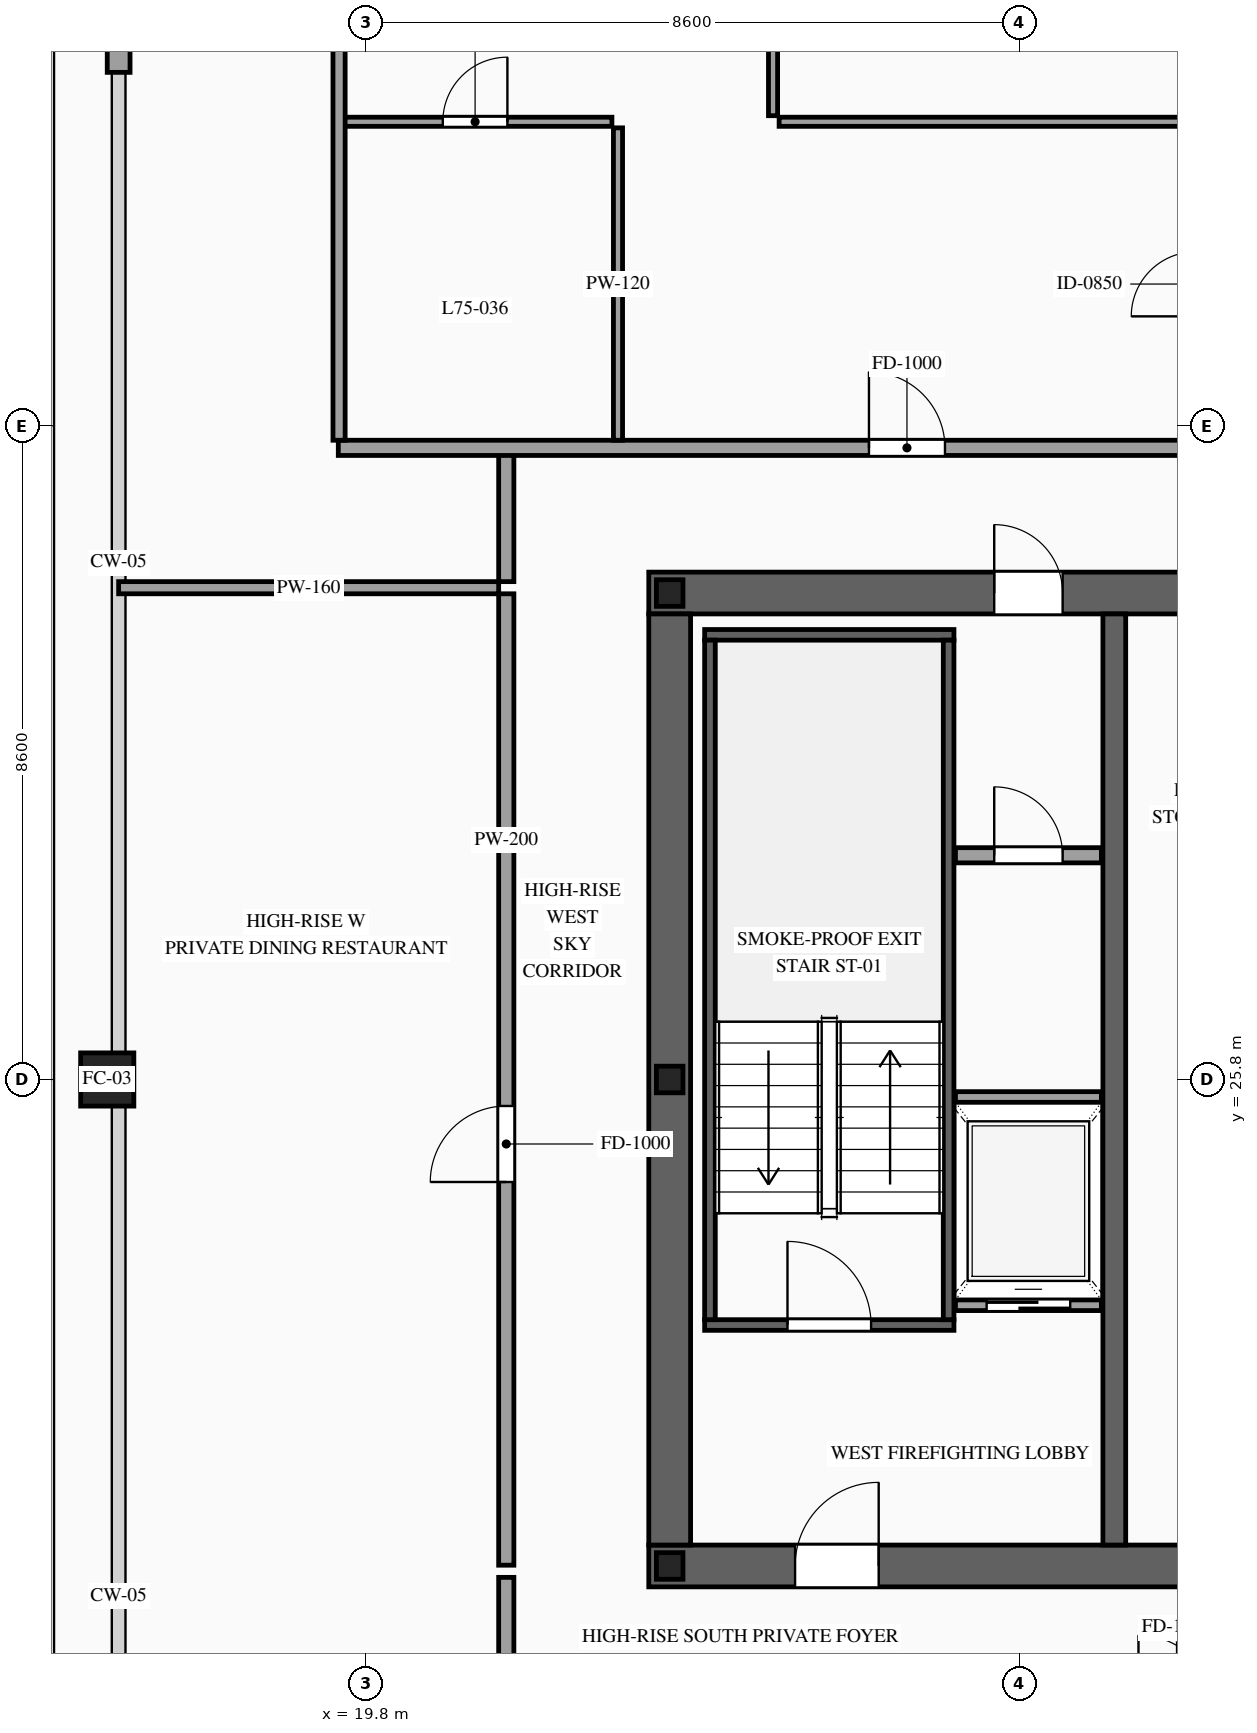
"""IFC4 building model, lengths in metres.
Left out: names, types, materials, properties, quantities, classifications, styles, units other than length and angle.
Written with IfcOpenShell. Run it as: python <this file> out.ifc"""

import sys

from ifc_helpers import new_model, si_unit, direction, frame, frame_2d, origin, origin_2d, place, context, subcontext, project, spatial, rectangle, hollow_rectangle, i_section, extrude, source, transform, mapped, element, fill, save


model = new_model("IFC4")
c1 = context("Model", 3, precision=1e-05, world=origin(), true_north=direction((0.0, 1.0)))
c2 = subcontext(c1, "Body", "Model", "MODEL_VIEW")
j1 = project(units=[si_unit("LENGTHUNIT", "METRE"), si_unit("PLANEANGLEUNIT", "RADIAN")], contexts=[c1])
p1 = place(None, origin())
s1 = spatial("IfcSite", under=j1, at=p1, CompositionType="ELEMENT")
p2 = place(p1, origin())
s2 = spatial("IfcBuilding", under=s1, at=p2, CompositionType="ELEMENT")
p3 = place(p2, frame((0.0, 0.0, 282.1)))
s3 = spatial("IfcBuildingStorey", under=s2, at=p3, CompositionType="ELEMENT", Elevation=282.1)
p4 = place(p3, frame((23.525, 19.4, 0.0), z_axis=(0.0, 0.0, 1.0), x_axis=(1.0, 0.0, 0.0)))
e1 = element("IfcWall", 1, at=p4, inside=s3, PredefinedType="SHEAR", context=c2, shape_type="SweptSolid", body=[
    extrude(rectangle(XDim=26.95, YDim=0.55, at=frame_2d((13.475, 0.0))), origin(), (0.0, 0.0, 1.0), 3.5),
])
p5 = place(p4, frame((1.925, 0.0, 0.0)))
e2 = element("IfcOpeningElement", 2, at=p5, cuts=e1, PredefinedType="OPENING", context=c2, shape_type="SweptSolid", body=[
    extrude(rectangle(XDim=1.1, YDim=2.2, at=frame_2d((0.55, 1.1))), frame((0.0, 0.29, 0.0), z_axis=(0.0, -1.0, 0.0), x_axis=(1.0, 0.0, 0.0)), (0.0, 0.0, 1.0), 0.58),
])
p6 = place(p4, frame((9.825, 0.0, 0.0)))
e3 = element("IfcOpeningElement", 3, at=p6, cuts=e1, PredefinedType="OPENING", context=c2, shape_type="SweptSolid", body=[
    extrude(rectangle(XDim=1.1, YDim=2.2, at=frame_2d((0.55, 1.1))), frame((0.0, 0.29, 0.0), z_axis=(0.0, -1.0, 0.0), x_axis=(1.0, 0.0, 0.0)), (0.0, 0.0, 1.0), 0.58),
])
p7 = place(p4, frame((23.025, 0.0, 0.0)))
e4 = element("IfcOpeningElement", 4, at=p7, cuts=e1, PredefinedType="OPENING", context=c2, shape_type="SweptSolid", body=[
    extrude(rectangle(XDim=1.1, YDim=2.2, at=frame_2d((0.55, 1.1))), frame((0.0, 0.29, 0.0), z_axis=(0.0, -1.0, 0.0), x_axis=(1.0, 0.0, 0.0)), (0.0, 0.0, 1.0), 0.58),
])
p8 = place(p4, frame((19.645, 0.0, 0.0)))
e5 = element("IfcOpeningElement", 5, at=p8, cuts=e1, PredefinedType="OPENING", context=c2, shape_type="SweptSolid", body=[
    extrude(rectangle(XDim=0.9, YDim=2.15, at=frame_2d((0.45, 1.075))), frame((0.0, 0.29, 0.0), z_axis=(0.0, -1.0, 0.0), x_axis=(1.0, 0.0, 0.0)), (0.0, 0.0, 1.0), 0.58),
])
p9 = place(p4, frame((18.205, 0.0, 0.0)))
e6 = element("IfcOpeningElement", 6, at=p9, cuts=e1, PredefinedType="OPENING", context=c2, shape_type="SweptSolid", body=[
    extrude(rectangle(XDim=0.9, YDim=2.15, at=frame_2d((0.45, 1.075))), frame((0.0, 0.29, 0.0), z_axis=(0.0, -1.0, 0.0), x_axis=(1.0, 0.0, 0.0)), (0.0, 0.0, 1.0), 0.58),
])
p10 = place(p3, frame((23.525, 32.2, 0.0), z_axis=(0.0, 0.0, 1.0), x_axis=(1.0, 0.0, 0.0)))
e7 = element("IfcWall", 7, at=p10, inside=s3, PredefinedType="SHEAR", context=c2, shape_type="SweptSolid", body=[
    extrude(rectangle(XDim=26.95, YDim=0.55, at=frame_2d((13.475, 0.0))), origin(), (0.0, 0.0, 1.0), 3.5),
])
p11 = place(p10, frame((4.545, 0.0, 0.0)))
e8 = element("IfcOpeningElement", 8, at=p11, cuts=e7, PredefinedType="OPENING", context=c2, shape_type="SweptSolid", body=[
    extrude(rectangle(XDim=0.9, YDim=2.15, at=frame_2d((0.45, 1.075))), frame((0.0, 0.29, 0.0), z_axis=(0.0, -1.0, 0.0), x_axis=(1.0, 0.0, 0.0)), (0.0, 0.0, 1.0), 0.58),
])
p12 = place(p10, frame((9.825, 0.0, 0.0)))
e9 = element("IfcOpeningElement", 9, at=p12, cuts=e7, PredefinedType="OPENING", context=c2, shape_type="SweptSolid", body=[
    extrude(rectangle(XDim=1.1, YDim=2.2, at=frame_2d((0.55, 1.1))), frame((0.0, 0.29, 0.0), z_axis=(0.0, -1.0, 0.0), x_axis=(1.0, 0.0, 0.0)), (0.0, 0.0, 1.0), 0.58),
])
p13 = place(p10, frame((15.675, 0.0, 0.0)))
e10 = element("IfcOpeningElement", 10, at=p13, cuts=e7, PredefinedType="OPENING", context=c2, shape_type="SweptSolid", body=[
    extrude(rectangle(XDim=1.1, YDim=2.2, at=frame_2d((0.55, 1.1))), frame((0.0, 0.29, 0.0), z_axis=(0.0, -1.0, 0.0), x_axis=(1.0, 0.0, 0.0)), (0.0, 0.0, 1.0), 0.58),
])
p14 = place(p10, frame((18.775, 0.0, 0.0)))
e11 = element("IfcOpeningElement", 11, at=p14, cuts=e7, PredefinedType="OPENING", context=c2, shape_type="SweptSolid", body=[
    extrude(rectangle(XDim=1.1, YDim=2.2, at=frame_2d((0.55, 1.1))), frame((0.0, 0.29, 0.0), z_axis=(0.0, -1.0, 0.0), x_axis=(1.0, 0.0, 0.0)), (0.0, 0.0, 1.0), 0.58),
])
m1 = source(origin(), c2, "Body", "SweptSolid", [
    extrude(rectangle(XDim=12.25, YDim=0.55, at=frame_2d((6.125, 0.0))), origin(), (0.0, 0.0, 1.0), 3.5),
])
p15 = place(p3, frame((23.8, 19.675, 0.0), z_axis=(0.0, 0.0, 1.0), x_axis=(0.0, 1.0, 0.0)))
e12 = element("IfcWall", 12, at=p15, inside=s3, PredefinedType="SHEAR", context=c2, shape_type="MappedRepresentation", body=[
    mapped(m1, transform((0.0, 0.0, 0.0), scale=1.0)),
])
m2 = source(origin(), c2, "Body", "SweptSolid", [
    extrude(rectangle(XDim=12.25, YDim=0.3, at=frame_2d((6.125, 0.0))), origin(), (0.0, 0.0, 1.0), 3.5),
])
p16 = place(p3, frame((29.65, 19.675, 0.0), z_axis=(0.0, 0.0, 1.0), x_axis=(0.0, 1.0, 0.0)))
e13 = element("IfcWall", 13, at=p16, inside=s3, PredefinedType="SOLIDWALL", context=c2, shape_type="MappedRepresentation", body=[
    mapped(m2, transform((0.0, 0.0, 0.0), scale=1.0)),
])
m3 = source(origin(), c2, "Body", "SweptSolid", [
    extrude(i_section(OverallWidth=0.35, OverallDepth=0.35, WebThickness=0.012, FlangeThickness=0.019, at=origin_2d()), origin(), (0.0, 0.0, 1.0), 3.5),
])
for number, where, z_axis, x_axis in (
    (14, (23.8, 19.4, 0.0), (0.0, 0.0, 1.0), (1.0, 0.0, 0.0)),
    (15, (23.8, 25.8, 0.0), (0.0, 0.0, 1.0), (1.0, 0.0, 0.0)),
    (16, (23.8, 32.2, 0.0), (0.0, 0.0, 1.0), (1.0, 0.0, 0.0)),
):
    element("IfcColumn", number, at=place(p3, frame(where, z_axis=z_axis, x_axis=x_axis)), inside=s3, PredefinedType="COLUMN", context=c2, shape_type="MappedRepresentation", body=[
        mapped(m3, transform((0.0, 0.0, 0.0), scale=1.0)),
    ])
m4 = source(origin(), c2, "Body", "SweptSolid", [
    extrude(hollow_rectangle(XDim=0.7, YDim=0.7, WallThickness=0.032, at=origin_2d()), origin(), (0.0, 0.0, 1.0), 3.28),
])
p17 = place(p3, frame((16.4, 25.8, 0.0), z_axis=(0.0, 0.0, 1.0), x_axis=(1.0, 0.0, 0.0)))
e17 = element("IfcColumn", 17, at=p17, inside=s3, PredefinedType="COLUMN", context=c2, shape_type="MappedRepresentation", body=[
    mapped(m4, transform((0.0, 0.0, 0.0), scale=1.0)),
])
m5 = source(origin(), c2, "Body", "SweptSolid", [
    extrude(rectangle(XDim=3.15, YDim=0.3, at=frame_2d((1.575, 0.0))), origin(), (0.0, 0.0, 1.0), 2.835),
])
p18 = place(p3, frame((16.55, 39.05, 0.0), z_axis=(0.0, 0.0, 1.0), x_axis=(0.0, 1.0, 0.0)))
e18 = element("IfcWall", 18, at=p18, inside=s3, PredefinedType="SOLIDWALL", context=c2, shape_type="MappedRepresentation", body=[
    mapped(m5, transform((0.0, 0.0, 0.0), scale=1.0)),
])
p19 = place(p3, frame((27.56, 22.83, 0.0), z_axis=(0.0, 0.0, 1.0), x_axis=(1.0, 0.0, 0.0)))
e19 = element("IfcWall", 19, at=p19, inside=s3, PredefinedType="SOLIDWALL", context=c2, shape_type="SweptSolid", body=[
    extrude(rectangle(XDim=1.92, YDim=0.14, at=frame_2d((0.96, 0.0))), origin(), (0.0, 0.0, 1.0), 3.28),
])
p20 = place(p19, frame((0.41, 0.0, 0.0)))
e20 = element("IfcOpeningElement", 20, at=p20, cuts=e19, PredefinedType="OPENING", context=c2, shape_type="SweptSolid", body=[
    extrude(rectangle(XDim=1.1, YDim=2.2, at=frame_2d((0.55, 1.1))), frame((0.0, 0.085, 0.0), z_axis=(0.0, -1.0, 0.0), x_axis=(1.0, 0.0, 0.0)), (0.0, 0.0, 1.0), 0.17),
])
m6 = source(origin(), c2, "Body", "SweptSolid", [
    extrude(rectangle(XDim=1.92, YDim=0.14, at=frame_2d((0.96, 0.0))), origin(), (0.0, 0.0, 1.0), 3.28),
])
p21 = place(p3, frame((27.56, 25.57, 0.0), z_axis=(0.0, 0.0, 1.0), x_axis=(1.0, 0.0, 0.0)))
e21 = element("IfcWall", 21, at=p21, inside=s3, PredefinedType="SOLIDWALL", context=c2, shape_type="MappedRepresentation", body=[
    mapped(m6, transform((0.0, 0.0, 0.0), scale=1.0)),
])
p22 = place(p3, frame((24.26, 22.57, 0.0), z_axis=(0.0, 0.0, 1.0), x_axis=(1.0, 0.0, 0.0)))
e22 = element("IfcWall", 22, at=p22, inside=s3, PredefinedType="SOLIDWALL", context=c2, shape_type="SweptSolid", body=[
    extrude(rectangle(XDim=3.28, YDim=0.14, at=frame_2d((1.64, 0.0))), origin(), (0.0, 0.0, 1.0), 3.28),
])
p23 = place(p22, frame((1.09, 0.0, 0.0)))
e23 = element("IfcOpeningElement", 23, at=p23, cuts=e22, PredefinedType="OPENING", context=c2, shape_type="SweptSolid", body=[
    extrude(rectangle(XDim=1.1, YDim=2.2, at=frame_2d((0.55, 1.1))), frame((0.0, 0.085, 0.0), z_axis=(0.0, -1.0, 0.0), x_axis=(1.0, 0.0, 0.0)), (0.0, 0.0, 1.0), 0.17),
])
m7 = source(origin(), c2, "Body", "SweptSolid", [
    extrude(rectangle(XDim=3.28, YDim=0.14, at=frame_2d((1.64, 0.0))), origin(), (0.0, 0.0, 1.0), 3.28),
])
p24 = place(p3, frame((24.26, 31.65, 0.0), z_axis=(0.0, 0.0, 1.0), x_axis=(1.0, 0.0, 0.0)))
e24 = element("IfcWall", 24, at=p24, inside=s3, PredefinedType="SOLIDWALL", context=c2, shape_type="MappedRepresentation", body=[
    mapped(m7, transform((0.0, 0.0, 0.0), scale=1.0)),
])
m8 = source(origin(), c2, "Body", "SweptSolid", [
    extrude(rectangle(XDim=8.94, YDim=0.14, at=frame_2d((4.47, 0.0))), origin(), (0.0, 0.0, 1.0), 3.28),
])
for number, where, z_axis, x_axis in (
    (25, (24.33, 22.64, 0.0), (0.0, 0.0, 1.0), (0.0, 1.0, 0.0)),
    (26, (27.47, 22.64, 0.0), (0.0, 0.0, 1.0), (0.0, 1.0, 0.0)),
):
    element("IfcWall", number, at=place(p3, frame(where, z_axis=z_axis, x_axis=x_axis)), inside=s3, PredefinedType="SOLIDWALL", context=c2, shape_type="MappedRepresentation", body=[
        mapped(m8, transform((0.0, 0.0, 0.0), scale=1.0)),
    ])
p25 = place(p3, frame((27.56, 28.75, 0.0), z_axis=(0.0, 0.0, 1.0), x_axis=(1.0, 0.0, 0.0)))
e27 = element("IfcWall", 27, at=p25, inside=s3, PredefinedType="PARTITIONING", context=c2, shape_type="SweptSolid", body=[
    extrude(rectangle(XDim=1.92, YDim=0.2, at=frame_2d((0.96, 0.0))), origin(), (0.0, 0.0, 1.0), 3.28),
])
p26 = place(p25, frame((0.51, 0.0, 0.0)))
e28 = element("IfcOpeningElement", 28, at=p26, cuts=e27, PredefinedType="OPENING", context=c2, shape_type="SweptSolid", body=[
    extrude(rectangle(XDim=0.9, YDim=2.15, at=frame_2d((0.45, 1.075))), frame((0.0, 0.115, 0.0), z_axis=(0.0, -1.0, 0.0), x_axis=(1.0, 0.0, 0.0)), (0.0, 0.0, 1.0), 0.23),
])
m9 = source(origin(), c2, "Body", "SweptSolid", [
    extrude(rectangle(XDim=1.7, YDim=0.2, at=frame_2d((0.85, 0.0))), origin(), (0.0, 0.0, 1.0), 3.28),
])
for number, where, z_axis, x_axis in (
    (29, (21.65, 32.35, 0.0), (0.0, 0.0, 1.0), (0.0, 1.0, 0.0)),
    (30, (21.65, 17.55, 0.0), (0.0, 0.0, 1.0), (0.0, 1.0, 0.0)),
):
    element("IfcWall", number, at=place(p3, frame(where, z_axis=z_axis, x_axis=x_axis)), inside=s3, PredefinedType="PARTITIONING", context=c2, shape_type="MappedRepresentation", body=[
        mapped(m9, transform((0.0, 0.0, 0.0), scale=1.0)),
    ])
p27 = place(p3, frame((19.44, 34.11, 0.0), z_axis=(0.0, 0.0, 1.0), x_axis=(1.0, 0.0, 0.0)))
e31 = element("IfcWall", 31, at=p27, inside=s3, PredefinedType="PARTITIONING", context=c2, shape_type="SweptSolid", body=[
    extrude(rectangle(XDim=16.075, YDim=0.2, at=frame_2d((8.038, 0.0))), origin(), (0.0, 0.0, 1.0), 3.28),
])
p28 = place(p27, frame((6.982, 0.0, 0.0)))
e32 = element("IfcOpeningElement", 32, at=p28, cuts=e31, PredefinedType="OPENING", context=c2, shape_type="SweptSolid", body=[
    extrude(rectangle(XDim=1.0, YDim=2.2, at=frame_2d((0.5, 1.1))), frame((0.0, 0.115, 0.0), z_axis=(0.0, -1.0, 0.0), x_axis=(1.0, 0.0, 0.0)), (0.0, 0.0, 1.0), 0.23),
])
p29 = place(p3, frame((19.44, 38.4, 0.0), z_axis=(0.0, 0.0, 1.0), x_axis=(1.0, 0.0, 0.0)))
e33 = element("IfcWall", 33, at=p29, inside=s3, PredefinedType="PARTITIONING", context=c2, shape_type="SweptSolid", body=[
    extrude(rectangle(XDim=3.6, YDim=0.12, at=frame_2d((1.8, 0.0))), origin(), (0.0, 0.0, 1.0), 3.28),
])
p30 = place(p29, frame((1.375, 0.0, 0.0)))
e34 = element("IfcOpeningElement", 34, at=p30, cuts=e33, PredefinedType="OPENING", context=c2, shape_type="SweptSolid", body=[
    extrude(rectangle(XDim=0.85, YDim=2.1, at=frame_2d((0.425, 1.05))), frame((0.0, 0.075, 0.0), z_axis=(0.0, -1.0, 0.0), x_axis=(1.0, 0.0, 0.0)), (0.0, 0.0, 1.0), 0.15),
])
m10 = source(origin(), c2, "Body", "SweptSolid", [
    extrude(rectangle(XDim=4.11, YDim=0.12, at=frame_2d((2.055, 0.0))), origin(), (0.0, 0.0, 1.0), 1.675),
])
p31 = place(p3, frame((23.12, 34.21, 0.0), z_axis=(0.0, 0.0, 1.0), x_axis=(0.0, 1.0, 0.0)))
e35 = element("IfcWall", 35, at=p31, inside=s3, PredefinedType="PARTITIONING", context=c2, shape_type="MappedRepresentation", body=[
    mapped(m10, transform((0.0, 0.0, 0.0), scale=1.0)),
])
m11 = source(origin(), c2, "Body", "SweptSolid", [
    extrude(rectangle(XDim=5.403, YDim=0.12, at=frame_2d((2.702, 0.0))), origin(), (0.0, 0.0, 1.0), 3.28),
])
p32 = place(p3, frame((25.24, 38.4, 0.0), z_axis=(0.0, 0.0, 1.0), x_axis=(1.0, 0.0, 0.0)))
e36 = element("IfcWall", 36, at=p32, inside=s3, PredefinedType="PARTITIONING", context=c2, shape_type="MappedRepresentation", body=[
    mapped(m11, transform((0.0, 0.0, 0.0), scale=1.0)),
])
p33 = place(p3, frame((25.16, 38.48, 0.0), z_axis=(0.0, 0.0, 1.0), x_axis=(0.0, 1.0, 0.0)))
e37 = element("IfcWall", 37, at=p33, inside=s3, PredefinedType="PARTITIONING", context=c2, shape_type="SweptSolid", body=[
    extrude(rectangle(XDim=7.77, YDim=0.12, at=frame_2d((3.885, 0.0))), origin(), (0.0, 0.0, 1.0), 3.28),
])
p34 = place(p33, frame((3.435, 0.0, 0.0)))
e38 = element("IfcOpeningElement", 38, at=p34, cuts=e37, PredefinedType="OPENING", context=c2, shape_type="SweptSolid", body=[
    extrude(rectangle(XDim=0.9, YDim=2.15, at=frame_2d((0.45, 1.075))), frame((0.0, 0.075, 0.0), z_axis=(0.0, -1.0, 0.0), x_axis=(1.0, 0.0, 0.0)), (0.0, 0.0, 1.0), 0.15),
])
m12 = source(origin(), c2, "Body", "SweptSolid", [
    extrude(rectangle(XDim=11.89, YDim=0.16, at=frame_2d((5.945, 0.0))), origin(), (0.0, 0.0, 1.0), 3.28),
])
p35 = place(p3, frame((19.45, 34.21, 0.0), z_axis=(0.0, 0.0, 1.0), x_axis=(0.0, 1.0, 0.0)))
e39 = element("IfcWall", 39, at=p35, inside=s3, PredefinedType="PARTITIONING", context=c2, shape_type="MappedRepresentation", body=[
    mapped(m12, transform((0.0, 0.0, 0.0), scale=1.0)),
])
p36 = place(p3, frame((21.65, 19.41, 0.0), z_axis=(0.0, 0.0, 1.0), x_axis=(0.0, 1.0, 0.0)))
e40 = element("IfcWall", 40, at=p36, inside=s3, PredefinedType="PARTITIONING", context=c2, shape_type="SweptSolid", body=[
    extrude(rectangle(XDim=12.78, YDim=0.2, at=frame_2d((6.39, 0.0))), origin(), (0.0, 0.0, 1.0), 3.28),
])
p37 = place(p36, frame((5.042, 0.0, 0.0)))
e41 = element("IfcOpeningElement", 41, at=p37, cuts=e40, PredefinedType="OPENING", context=c2, shape_type="SweptSolid", body=[
    extrude(rectangle(XDim=1.0, YDim=2.2, at=frame_2d((0.5, 1.1))), frame((0.0, 0.115, 0.0), z_axis=(0.0, -1.0, 0.0), x_axis=(1.0, 0.0, 0.0)), (0.0, 0.0, 1.0), 0.23),
])
m13 = source(origin(), c2, "Body", "SweptSolid", [
    extrude(rectangle(XDim=5.0, YDim=0.16, at=frame_2d((2.5, 0.0))), origin(), (0.0, 0.0, 1.0), 3.28),
])
p38 = place(p3, frame((16.55, 32.27, 0.0), z_axis=(0.0, 0.0, 1.0), x_axis=(1.0, 0.0, 0.0)))
e42 = element("IfcWall", 42, at=p38, inside=s3, PredefinedType="PARTITIONING", context=c2, shape_type="MappedRepresentation", body=[
    mapped(m13, transform((0.0, 0.0, 0.0), scale=1.0)),
])
m14 = source(origin(), c2, "Body", "SweptSolid", [
    extrude(rectangle(XDim=1.1, YDim=2.2, at=frame_2d((0.55, 1.1))), frame((0.0, 0.025, 0.0), z_axis=(0.0, -1.0, 0.0), x_axis=(1.0, 0.0, 0.0)), (0.0, 0.0, 1.0), 0.05),
])
p39 = place(p20, origin())
e43 = element("IfcDoor", 43, at=p39, inside=s3, OperationType="SLIDING_TO_LEFT", PredefinedType="DOOR", context=c2, shape_type="MappedRepresentation", body=[
    mapped(m14, transform((0.0, 0.0, 0.0), scale=1.0)),
])
fill(e20, e43)
m15 = source(origin(), c2, "Body", "SweptSolid", [
    extrude(rectangle(XDim=1.1, YDim=2.2, at=frame_2d((0.55, 1.1))), frame((0.0, 0.025, 0.0), z_axis=(0.0, -1.0, 0.0), x_axis=(1.0, 0.0, 0.0)), (0.0, 0.0, 1.0), 0.05),
])
p40 = place(p23, origin())
e44 = element("IfcDoor", 44, at=p40, inside=s3, OperationType="SINGLE_SWING_LEFT", PredefinedType="DOOR", context=c2, shape_type="MappedRepresentation", body=[
    mapped(m15, transform((0.0, 0.0, 0.0), scale=1.0)),
])
fill(e23, e44)
p41 = place(p5, origin())
e45 = element("IfcDoor", 45, at=p41, inside=s3, OperationType="SINGLE_SWING_RIGHT", PredefinedType="DOOR", context=c2, shape_type="MappedRepresentation", body=[
    mapped(m15, transform((0.0, 0.0, 0.0), scale=1.0)),
])
fill(e2, e45)
m16 = source(origin(), c2, "Body", "SweptSolid", [
    extrude(rectangle(XDim=0.9, YDim=2.15, at=frame_2d((0.45, 1.075))), frame((0.0, 0.025, 0.0), z_axis=(0.0, -1.0, 0.0), x_axis=(1.0, 0.0, 0.0)), (0.0, 0.0, 1.0), 0.05),
])
p42 = place(p11, origin())
e46 = element("IfcDoor", 46, at=p42, inside=s3, OperationType="SINGLE_SWING_LEFT", PredefinedType="DOOR", context=c2, shape_type="MappedRepresentation", body=[
    mapped(m16, transform((0.0, 0.0, 0.0), scale=1.0)),
])
fill(e8, e46)
p43 = place(p26, origin())
e47 = element("IfcDoor", 47, at=p43, inside=s3, OperationType="SINGLE_SWING_LEFT", PredefinedType="DOOR", context=c2, shape_type="MappedRepresentation", body=[
    mapped(m16, transform((0.0, 0.0, 0.0), scale=1.0)),
])
fill(e28, e47)
m17 = source(origin(), c2, "Body", "SweptSolid", [
    extrude(rectangle(XDim=1.0, YDim=2.2, at=frame_2d((0.5, 1.1))), frame((0.0, 0.025, 0.0), z_axis=(0.0, -1.0, 0.0), x_axis=(1.0, 0.0, 0.0)), (0.0, 0.0, 1.0), 0.05),
])
p44 = place(p28, origin())
e48 = element("IfcDoor", 48, at=p44, inside=s3, OperationType="SINGLE_SWING_LEFT", PredefinedType="DOOR", context=c2, shape_type="MappedRepresentation", body=[
    mapped(m17, transform((0.0, 0.0, 0.0), scale=1.0)),
])
fill(e32, e48)
m18 = source(origin(), c2, "Body", "SweptSolid", [
    extrude(rectangle(XDim=0.85, YDim=2.1, at=frame_2d((0.425, 1.05))), frame((0.0, 0.025, 0.0), z_axis=(0.0, -1.0, 0.0), x_axis=(1.0, 0.0, 0.0)), (0.0, 0.0, 1.0), 0.05),
])
p45 = place(p30, origin())
e49 = element("IfcDoor", 49, at=p45, inside=s3, OperationType="SINGLE_SWING_RIGHT", PredefinedType="DOOR", context=c2, shape_type="MappedRepresentation", body=[
    mapped(m18, transform((0.0, 0.0, 0.0), scale=1.0)),
])
fill(e34, e49)
p46 = place(p37, origin())
e50 = element("IfcDoor", 50, at=p46, inside=s3, OperationType="SINGLE_SWING_LEFT", PredefinedType="DOOR", context=c2, shape_type="MappedRepresentation", body=[
    mapped(m17, transform((0.0, 0.0, 0.0), scale=1.0)),
])
fill(e41, e50)
save(model, sys.argv[1])
